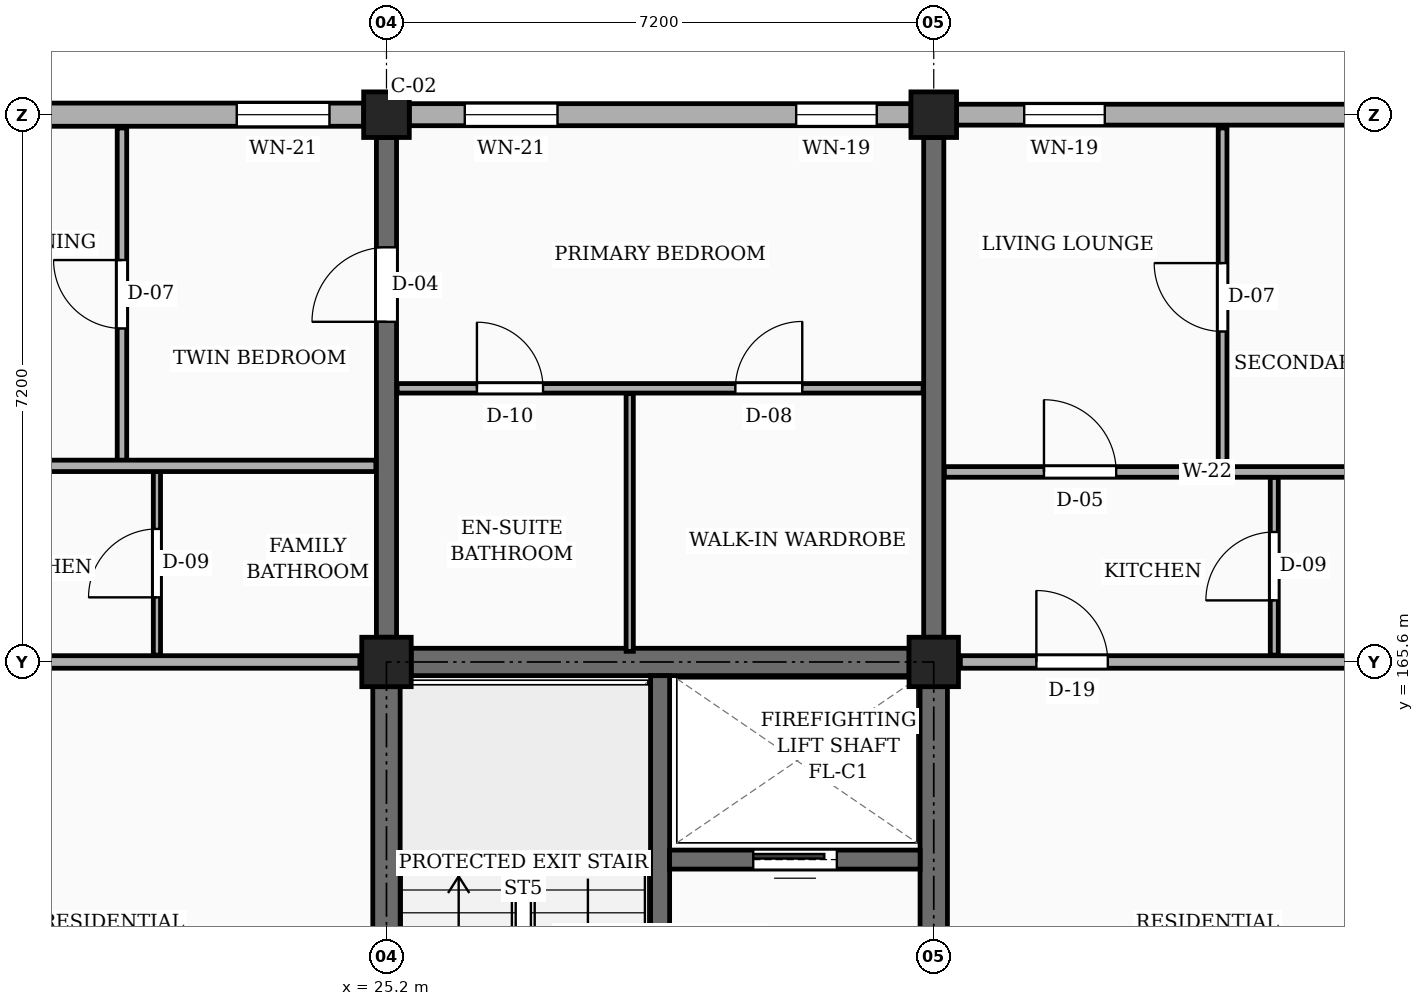
"""IFC4 building model, lengths in metres.
Left out: names, types, materials, properties, quantities, classifications, styles, units other than length and angle.
Written with IfcOpenShell. Run it as: python <this file> out.ifc"""

import sys

from ifc_helpers import new_model, si_unit, direction, frame, frame_2d, origin, origin_2d, place, context, subcontext, project, spatial, rectangle, extrude, element, fill, save


model = new_model("IFC4")
c1 = context("Model", 3, precision=1e-05, world=origin(), true_north=direction((0.0, 1.0)))
c2 = subcontext(c1, "Body", "Model", "MODEL_VIEW")
j1 = project(units=[si_unit("LENGTHUNIT", "METRE"), si_unit("PLANEANGLEUNIT", "RADIAN")], contexts=[c1])
p1 = place(None, origin())
s1 = spatial("IfcSite", under=j1, at=p1, CompositionType="ELEMENT")
p2 = place(p1, origin())
s2 = spatial("IfcBuilding", under=s1, at=p2, CompositionType="ELEMENT")
p3 = place(p2, frame((0.0, 0.0, 4.5)))
s3 = spatial("IfcBuildingStorey", under=s2, at=p3, CompositionType="ELEMENT", Elevation=4.5)
p4 = place(p3, frame((25.2, 165.6, 0.0), z_axis=(0.0, 0.0, 1.0), x_axis=(1.0, 0.0, 0.0)))
e1 = element("IfcColumn", 1, at=p4, inside=s3, PredefinedType="COLUMN", context=c2, shape_type="SweptSolid", body=[
    extrude(rectangle(XDim=0.65, YDim=0.65, at=origin_2d()), origin(), (0.0, 0.0, 1.0), 3.15),
])
p5 = place(p3, frame((25.2, 172.8, 0.0), z_axis=(0.0, 0.0, 1.0), x_axis=(1.0, 0.0, 0.0)))
e2 = element("IfcColumn", 2, at=p5, inside=s3, PredefinedType="COLUMN", context=c2, shape_type="SweptSolid", body=[
    extrude(rectangle(XDim=0.6, YDim=0.6, at=origin_2d()), origin(), (0.0, 0.0, 1.0), 3.15),
])
p6 = place(p3, frame((32.4, 165.6, 0.0), z_axis=(0.0, 0.0, 1.0), x_axis=(1.0, 0.0, 0.0)))
e3 = element("IfcColumn", 3, at=p6, inside=s3, PredefinedType="COLUMN", context=c2, shape_type="SweptSolid", body=[
    extrude(rectangle(XDim=0.65, YDim=0.65, at=origin_2d()), origin(), (0.0, 0.0, 1.0), 3.15),
])
p7 = place(p3, frame((32.4, 172.8, 0.0), z_axis=(0.0, 0.0, 1.0), x_axis=(1.0, 0.0, 0.0)))
e4 = element("IfcColumn", 4, at=p7, inside=s3, PredefinedType="COLUMN", context=c2, shape_type="SweptSolid", body=[
    extrude(rectangle(XDim=0.6, YDim=0.6, at=origin_2d()), origin(), (0.0, 0.0, 1.0), 3.15),
])
p8 = place(p3, frame((25.2, 165.925, 0.0), z_axis=(0.0, 0.0, 1.0), x_axis=(0.0, 1.0, 0.0)))
e5 = element("IfcWall", 5, at=p8, inside=s3, PredefinedType="SOLIDWALL", context=c2, shape_type="SweptSolid", body=[
    extrude(rectangle(XDim=6.575, YDim=0.265, at=frame_2d((3.288, 0.0))), origin(), (0.0, 0.0, 1.0), 2.185),
])
p9 = place(p8, frame((4.15, 0.0, 0.0)))
e6 = element("IfcOpeningElement", 6, at=p9, cuts=e5, PredefinedType="OPENING", context=c2, shape_type="SweptSolid", body=[
    extrude(rectangle(XDim=0.98, YDim=2.12, at=frame_2d((0.49, 1.06))), frame((0.0, 0.143, 0.0), z_axis=(0.0, -1.0, 0.0), x_axis=(1.0, 0.0, 0.0)), (0.0, 0.0, 1.0), 0.285),
])
p10 = place(p3, frame((32.4, 165.925, 0.0), z_axis=(0.0, 0.0, 1.0), x_axis=(0.0, 1.0, 0.0)))
e7 = element("IfcWall", 7, at=p10, inside=s3, PredefinedType="SOLIDWALL", context=c2, shape_type="SweptSolid", body=[
    extrude(rectangle(XDim=6.575, YDim=0.265, at=frame_2d((3.288, 0.0))), origin(), (0.0, 0.0, 1.0), 2.185),
])
p11 = place(p3, frame((39.3, 172.8, 0.0), z_axis=(0.0, 0.0, 1.0), x_axis=(-1.0, 0.0, 0.0)))
e8 = element("IfcWall", 8, at=p11, inside=s3, PredefinedType="SOLIDWALL", context=c2, shape_type="SweptSolid", body=[
    extrude(rectangle(XDim=6.6, YDim=0.275, at=frame_2d((3.3, 0.0))), origin(), (0.0, 0.0, 1.0), 2.455),
])
p12 = place(p11, frame((0.45, 0.0, 0.78)))
e9 = element("IfcOpeningElement", 9, at=p12, cuts=e8, PredefinedType="OPENING", context=c2, shape_type="SweptSolid", body=[
    extrude(rectangle(XDim=0.9, YDim=1.36, at=frame_2d((0.45, 0.68))), frame((0.0, 0.147, 0.0), z_axis=(0.0, -1.0, 0.0), x_axis=(1.0, 0.0, 0.0)), (0.0, 0.0, 1.0), 0.295),
])
p13 = place(p11, frame((4.65, 0.0, 0.78)))
e10 = element("IfcOpeningElement", 10, at=p13, cuts=e8, PredefinedType="OPENING", context=c2, shape_type="SweptSolid", body=[
    extrude(rectangle(XDim=1.06, YDim=1.36, at=frame_2d((0.53, 0.68))), frame((0.0, 0.147, 0.0), z_axis=(0.0, -1.0, 0.0), x_axis=(1.0, 0.0, 0.0)), (0.0, 0.0, 1.0), 0.295),
])
p14 = place(p3, frame((32.1, 172.8, 0.0), z_axis=(0.0, 0.0, 1.0), x_axis=(-1.0, 0.0, 0.0)))
e11 = element("IfcWall", 11, at=p14, inside=s3, PredefinedType="SOLIDWALL", context=c2, shape_type="SweptSolid", body=[
    extrude(rectangle(XDim=6.6, YDim=0.29, at=frame_2d((3.3, 0.0))), origin(), (0.0, 0.0, 1.0), 2.455),
])
p15 = place(p14, frame((0.45, 0.0, 0.78)))
e12 = element("IfcOpeningElement", 12, at=p15, cuts=e11, PredefinedType="OPENING", context=c2, shape_type="SweptSolid", body=[
    extrude(rectangle(XDim=1.06, YDim=1.36, at=frame_2d((0.53, 0.68))), frame((0.0, 0.155, 0.0), z_axis=(0.0, -1.0, 0.0), x_axis=(1.0, 0.0, 0.0)), (0.0, 0.0, 1.0), 0.31),
])
p16 = place(p14, frame((4.65, 0.0, 0.78)))
e13 = element("IfcOpeningElement", 13, at=p16, cuts=e11, PredefinedType="OPENING", context=c2, shape_type="SweptSolid", body=[
    extrude(rectangle(XDim=1.22, YDim=1.36, at=frame_2d((0.61, 0.68))), frame((0.0, 0.155, 0.0), z_axis=(0.0, -1.0, 0.0), x_axis=(1.0, 0.0, 0.0)), (0.0, 0.0, 1.0), 0.31),
])
p17 = place(p3, frame((24.9, 172.8, 0.0), z_axis=(0.0, 0.0, 1.0), x_axis=(-1.0, 0.0, 0.0)))
e14 = element("IfcWall", 14, at=p17, inside=s3, PredefinedType="SOLIDWALL", context=c2, shape_type="SweptSolid", body=[
    extrude(rectangle(XDim=6.6, YDim=0.305, at=frame_2d((3.3, 0.0))), origin(), (0.0, 0.0, 1.0), 2.455),
])
p18 = place(p17, frame((0.45, 0.0, 0.78)))
e15 = element("IfcOpeningElement", 15, at=p18, cuts=e14, PredefinedType="OPENING", context=c2, shape_type="SweptSolid", body=[
    extrude(rectangle(XDim=1.22, YDim=1.36, at=frame_2d((0.61, 0.68))), frame((0.0, 0.163, 0.0), z_axis=(0.0, -1.0, 0.0), x_axis=(1.0, 0.0, 0.0)), (0.0, 0.0, 1.0), 0.325),
])
p19 = place(p17, frame((4.65, 0.0, 0.78)))
e16 = element("IfcOpeningElement", 16, at=p19, cuts=e14, PredefinedType="OPENING", context=c2, shape_type="SweptSolid", body=[
    extrude(rectangle(XDim=1.38, YDim=1.36, at=frame_2d((0.69, 0.68))), frame((0.0, 0.163, 0.0), z_axis=(0.0, -1.0, 0.0), x_axis=(1.0, 0.0, 0.0)), (0.0, 0.0, 1.0), 0.325),
])
p20 = place(p3, frame((25.2, 158.725, 0.0), z_axis=(0.0, 0.0, 1.0), x_axis=(0.0, 1.0, 0.0)))
e17 = element("IfcWall", 17, at=p20, inside=s3, PredefinedType="SHEAR", context=c2, shape_type="SweptSolid", body=[
    extrude(rectangle(XDim=6.55, YDim=0.36, at=frame_2d((3.275, 0.0))), origin(), (0.0, 0.0, 1.0), 2.885),
])
p21 = place(p3, frame((25.525, 165.6, 0.0), z_axis=(0.0, 0.0, 1.0), x_axis=(1.0, 0.0, 0.0)))
e18 = element("IfcWall", 18, at=p21, inside=s3, PredefinedType="SHEAR", context=c2, shape_type="SweptSolid", body=[
    extrude(rectangle(XDim=6.55, YDim=0.36, at=frame_2d((3.275, 0.0))), origin(), (0.0, 0.0, 1.0), 2.885),
])
p22 = place(p3, frame((32.4, 158.725, 0.0), z_axis=(0.0, 0.0, 1.0), x_axis=(0.0, 1.0, 0.0)))
e19 = element("IfcWall", 19, at=p22, inside=s3, PredefinedType="SHEAR", context=c2, shape_type="SweptSolid", body=[
    extrude(rectangle(XDim=6.55, YDim=0.36, at=frame_2d((3.275, 0.0))), origin(), (0.0, 0.0, 1.0), 2.885),
])
p23 = place(p3, frame((28.8, 158.58, 0.0), z_axis=(0.0, 0.0, 1.0), x_axis=(0.0, 1.0, 0.0)))
e20 = element("IfcWall", 20, at=p23, inside=s3, PredefinedType="SHEAR", context=c2, shape_type="SweptSolid", body=[
    extrude(rectangle(XDim=6.84, YDim=0.25, at=frame_2d((3.42, 0.0))), origin(), (0.0, 0.0, 1.0), 2.885),
])
p24 = place(p23, frame((0.42, 0.0, 0.0)))
e21 = element("IfcOpeningElement", 21, at=p24, cuts=e20, PredefinedType="OPENING", context=c2, shape_type="SweptSolid", body=[
    extrude(rectangle(XDim=1.05, YDim=2.15, at=frame_2d((0.525, 1.075))), frame((0.0, 0.135, 0.0), z_axis=(0.0, -1.0, 0.0), x_axis=(1.0, 0.0, 0.0)), (0.0, 0.0, 1.0), 0.27),
])
p25 = place(p3, frame((28.925, 163.0, 0.0), z_axis=(0.0, 0.0, 1.0), x_axis=(1.0, 0.0, 0.0)))
e22 = element("IfcWall", 22, at=p25, inside=s3, PredefinedType="SHEAR", context=c2, shape_type="SweptSolid", body=[
    extrude(rectangle(XDim=3.295, YDim=0.25, at=frame_2d((1.647, 0.0))), origin(), (0.0, 0.0, 1.0), 2.885),
])
p26 = place(p25, frame((1.1, 0.0, 0.0)))
e23 = element("IfcOpeningElement", 23, at=p26, cuts=e22, PredefinedType="OPENING", context=c2, shape_type="SweptSolid", body=[
    extrude(rectangle(XDim=1.1, YDim=2.2, at=frame_2d((0.55, 1.1))), frame((0.0, 0.135, 0.0), z_axis=(0.0, -1.0, 0.0), x_axis=(1.0, 0.0, 0.0)), (0.0, 0.0, 1.0), 0.27),
])
p27 = place(p3, frame((18.35, 165.6, 0.0), z_axis=(0.0, 0.0, 1.0), x_axis=(1.0, 0.0, 0.0)))
e24 = element("IfcWall", 24, at=p27, inside=s3, PredefinedType="PARTITIONING", context=c2, shape_type="SweptSolid", body=[
    extrude(rectangle(XDim=6.5, YDim=0.165, at=frame_2d((3.25, 0.0))), origin(), (0.0, 0.0, 1.0), 2.185),
])
p28 = place(p27, frame((1.0, 0.0, 0.0)))
e25 = element("IfcOpeningElement", 25, at=p28, cuts=e24, PredefinedType="OPENING", context=c2, shape_type="SweptSolid", body=[
    extrude(rectangle(XDim=1.0, YDim=2.15, at=frame_2d((0.5, 1.075))), frame((0.0, 0.093, 0.0), z_axis=(0.0, -1.0, 0.0), x_axis=(1.0, 0.0, 0.0)), (0.0, 0.0, 1.0), 0.185),
])
p29 = place(p3, frame((32.75, 165.6, 0.0), z_axis=(0.0, 0.0, 1.0), x_axis=(1.0, 0.0, 0.0)))
e26 = element("IfcWall", 26, at=p29, inside=s3, PredefinedType="PARTITIONING", context=c2, shape_type="SweptSolid", body=[
    extrude(rectangle(XDim=6.5, YDim=0.165, at=frame_2d((3.25, 0.0))), origin(), (0.0, 0.0, 1.0), 2.185),
])
p30 = place(p29, frame((1.0, 0.0, 0.0)))
e27 = element("IfcOpeningElement", 27, at=p30, cuts=e26, PredefinedType="OPENING", context=c2, shape_type="SweptSolid", body=[
    extrude(rectangle(XDim=0.94, YDim=2.12, at=frame_2d((0.47, 1.06))), frame((0.0, 0.093, 0.0), z_axis=(0.0, -1.0, 0.0), x_axis=(1.0, 0.0, 0.0)), (0.0, 0.0, 1.0), 0.185),
])
p31 = place(p3, frame((21.72, 168.25, 0.0), z_axis=(0.0, 0.0, 1.0), x_axis=(0.0, 1.0, 0.0)))
e28 = element("IfcWall", 28, at=p31, inside=s3, PredefinedType="PARTITIONING", context=c2, shape_type="SweptSolid", body=[
    extrude(rectangle(XDim=4.375, YDim=0.125, at=frame_2d((2.188, 0.0))), origin(), (0.0, 0.0, 1.0), 2.32),
])
p32 = place(p31, frame((1.738, 0.0, 0.0)))
e29 = element("IfcOpeningElement", 29, at=p32, cuts=e28, PredefinedType="OPENING", context=c2, shape_type="SweptSolid", body=[
    extrude(rectangle(XDim=0.9, YDim=2.1, at=frame_2d((0.45, 1.05))), frame((0.0, 0.073, 0.0), z_axis=(0.0, -1.0, 0.0), x_axis=(1.0, 0.0, 0.0)), (0.0, 0.0, 1.0), 0.145),
])
p33 = place(p3, frame((22.18, 165.69, 0.0), z_axis=(0.0, 0.0, 1.0), x_axis=(0.0, 1.0, 0.0)))
e30 = element("IfcWall", 30, at=p33, inside=s3, PredefinedType="PARTITIONING", context=c2, shape_type="SweptSolid", body=[
    extrude(rectangle(XDim=2.42, YDim=0.095, at=frame_2d((1.21, 0.0))), origin(), (0.0, 0.0, 1.0), 2.32),
])
p34 = place(p33, frame((0.76, 0.0, 0.0)))
e31 = element("IfcOpeningElement", 31, at=p34, cuts=e30, PredefinedType="OPENING", context=c2, shape_type="SweptSolid", body=[
    extrude(rectangle(XDim=0.9, YDim=2.05, at=frame_2d((0.45, 1.025))), frame((0.0, 0.058, 0.0), z_axis=(0.0, -1.0, 0.0), x_axis=(1.0, 0.0, 0.0)), (0.0, 0.0, 1.0), 0.115),
])
p35 = place(p3, frame((18.14, 168.18, 0.0), z_axis=(0.0, 0.0, 1.0), x_axis=(1.0, 0.0, 0.0)))
e32 = element("IfcWall", 32, at=p35, inside=s3, PredefinedType="PARTITIONING", context=c2, shape_type="SweptSolid", body=[
    extrude(rectangle(XDim=6.92, YDim=0.15, at=frame_2d((3.46, 0.0))), origin(), (0.0, 0.0, 1.0), 2.32),
])
p36 = place(p35, frame((1.31, 0.0, 0.0)))
e33 = element("IfcOpeningElement", 33, at=p36, cuts=e32, PredefinedType="OPENING", context=c2, shape_type="SweptSolid", body=[
    extrude(rectangle(XDim=0.95, YDim=2.1, at=frame_2d((0.475, 1.05))), frame((0.0, 0.085, 0.0), z_axis=(0.0, -1.0, 0.0), x_axis=(1.0, 0.0, 0.0)), (0.0, 0.0, 1.0), 0.17),
])
p37 = place(p3, frame((25.34, 169.2, 0.0), z_axis=(0.0, 0.0, 1.0), x_axis=(1.0, 0.0, 0.0)))
e34 = element("IfcWall", 34, at=p37, inside=s3, PredefinedType="PARTITIONING", context=c2, shape_type="SweptSolid", body=[
    extrude(rectangle(XDim=6.92, YDim=0.125, at=frame_2d((3.46, 0.0))), origin(), (0.0, 0.0, 1.0), 2.32),
])
p38 = place(p37, frame((1.05, 0.0, 0.0)))
e35 = element("IfcOpeningElement", 35, at=p38, cuts=e34, PredefinedType="OPENING", context=c2, shape_type="SweptSolid", body=[
    extrude(rectangle(XDim=0.87, YDim=2.05, at=frame_2d((0.435, 1.025))), frame((0.0, 0.073, 0.0), z_axis=(0.0, -1.0, 0.0), x_axis=(1.0, 0.0, 0.0)), (0.0, 0.0, 1.0), 0.145),
])
p39 = place(p37, frame((4.45, 0.0, 0.0)))
e36 = element("IfcOpeningElement", 36, at=p39, cuts=e34, PredefinedType="OPENING", context=c2, shape_type="SweptSolid", body=[
    extrude(rectangle(XDim=0.88, YDim=2.08, at=frame_2d((0.44, 1.04))), frame((0.0, 0.073, 0.0), z_axis=(0.0, -1.0, 0.0), x_axis=(1.0, 0.0, 0.0)), (0.0, 0.0, 1.0), 0.145),
])
p40 = place(p3, frame((28.4, 165.74, 0.0), z_axis=(0.0, 0.0, 1.0), x_axis=(0.0, 1.0, 0.0)))
e37 = element("IfcWall", 37, at=p40, inside=s3, PredefinedType="PARTITIONING", context=c2, shape_type="SweptSolid", body=[
    extrude(rectangle(XDim=3.39, YDim=0.095, at=frame_2d((1.695, 0.0))), origin(), (0.0, 0.0, 1.0), 2.32),
])
p41 = place(p3, frame((36.2, 168.17, 0.0), z_axis=(0.0, 0.0, 1.0), x_axis=(0.0, 1.0, 0.0)))
e38 = element("IfcWall", 38, at=p41, inside=s3, PredefinedType="PARTITIONING", context=c2, shape_type="SweptSolid", body=[
    extrude(rectangle(XDim=4.455, YDim=0.115, at=frame_2d((2.228, 0.0))), origin(), (0.0, 0.0, 1.0), 2.32),
])
p42 = place(p41, frame((1.778, 0.0, 0.0)))
e39 = element("IfcOpeningElement", 39, at=p42, cuts=e38, PredefinedType="OPENING", context=c2, shape_type="SweptSolid", body=[
    extrude(rectangle(XDim=0.9, YDim=2.1, at=frame_2d((0.45, 1.05))), frame((0.0, 0.067, 0.0), z_axis=(0.0, -1.0, 0.0), x_axis=(1.0, 0.0, 0.0)), (0.0, 0.0, 1.0), 0.135),
])
p43 = place(p3, frame((36.88, 165.69, 0.0), z_axis=(0.0, 0.0, 1.0), x_axis=(0.0, 1.0, 0.0)))
e40 = element("IfcWall", 40, at=p43, inside=s3, PredefinedType="PARTITIONING", context=c2, shape_type="SweptSolid", body=[
    extrude(rectangle(XDim=2.34, YDim=0.105, at=frame_2d((1.17, 0.0))), origin(), (0.0, 0.0, 1.0), 2.32),
])
p44 = place(p43, frame((0.72, 0.0, 0.0)))
e41 = element("IfcOpeningElement", 41, at=p44, cuts=e40, PredefinedType="OPENING", context=c2, shape_type="SweptSolid", body=[
    extrude(rectangle(XDim=0.9, YDim=2.05, at=frame_2d((0.45, 1.025))), frame((0.0, 0.062, 0.0), z_axis=(0.0, -1.0, 0.0), x_axis=(1.0, 0.0, 0.0)), (0.0, 0.0, 1.0), 0.125),
])
p45 = place(p3, frame((32.54, 168.1, 0.0), z_axis=(0.0, 0.0, 1.0), x_axis=(1.0, 0.0, 0.0)))
e42 = element("IfcWall", 42, at=p45, inside=s3, PredefinedType="PARTITIONING", context=c2, shape_type="SweptSolid", body=[
    extrude(rectangle(XDim=6.92, YDim=0.14, at=frame_2d((3.46, 0.0))), origin(), (0.0, 0.0, 1.0), 2.32),
])
p46 = place(p45, frame((1.31, 0.0, 0.0)))
e43 = element("IfcOpeningElement", 43, at=p46, cuts=e42, PredefinedType="OPENING", context=c2, shape_type="SweptSolid", body=[
    extrude(rectangle(XDim=0.95, YDim=2.1, at=frame_2d((0.475, 1.05))), frame((0.0, 0.08, 0.0), z_axis=(0.0, -1.0, 0.0), x_axis=(1.0, 0.0, 0.0)), (0.0, 0.0, 1.0), 0.16),
])
p47 = place(p13, origin())
e44 = element("IfcWindow", 44, at=p47, inside=s3, PartitioningType="SINGLE_PANEL", PredefinedType="WINDOW", context=c2, shape_type="SweptSolid", body=[
    extrude(rectangle(XDim=1.06, YDim=1.36, at=frame_2d((0.53, 0.68))), frame((0.0, 0.03, 0.0), z_axis=(0.0, -1.0, 0.0), x_axis=(1.0, 0.0, 0.0)), (0.0, 0.0, 1.0), 0.06),
])
fill(e10, e44)
p48 = place(p15, origin())
e45 = element("IfcWindow", 45, at=p48, inside=s3, PartitioningType="SINGLE_PANEL", PredefinedType="WINDOW", context=c2, shape_type="SweptSolid", body=[
    extrude(rectangle(XDim=1.06, YDim=1.36, at=frame_2d((0.53, 0.68))), frame((0.0, 0.03, 0.0), z_axis=(0.0, -1.0, 0.0), x_axis=(1.0, 0.0, 0.0)), (0.0, 0.0, 1.0), 0.06),
])
fill(e12, e45)
p49 = place(p16, origin())
e46 = element("IfcWindow", 46, at=p49, inside=s3, PartitioningType="SINGLE_PANEL", PredefinedType="WINDOW", context=c2, shape_type="SweptSolid", body=[
    extrude(rectangle(XDim=1.22, YDim=1.36, at=frame_2d((0.61, 0.68))), frame((0.0, 0.03, 0.0), z_axis=(0.0, -1.0, 0.0), x_axis=(1.0, 0.0, 0.0)), (0.0, 0.0, 1.0), 0.06),
])
fill(e13, e46)
p50 = place(p18, origin())
e47 = element("IfcWindow", 47, at=p50, inside=s3, PartitioningType="SINGLE_PANEL", PredefinedType="WINDOW", context=c2, shape_type="SweptSolid", body=[
    extrude(rectangle(XDim=1.22, YDim=1.36, at=frame_2d((0.61, 0.68))), frame((0.0, 0.03, 0.0), z_axis=(0.0, -1.0, 0.0), x_axis=(1.0, 0.0, 0.0)), (0.0, 0.0, 1.0), 0.06),
])
fill(e15, e47)
p51 = place(p26, origin())
e48 = element("IfcDoor", 48, at=p51, inside=s3, OperationType="SLIDING_TO_LEFT", PredefinedType="DOOR", context=c2, shape_type="SweptSolid", body=[
    extrude(rectangle(XDim=1.1, YDim=2.2, at=frame_2d((0.55, 1.1))), frame((0.0, 0.025, 0.0), z_axis=(0.0, -1.0, 0.0), x_axis=(1.0, 0.0, 0.0)), (0.0, 0.0, 1.0), 0.05),
])
fill(e23, e48)
p52 = place(p30, origin())
e49 = element("IfcDoor", 49, at=p52, inside=s3, OperationType="SINGLE_SWING_LEFT", PredefinedType="DOOR", context=c2, shape_type="SweptSolid", body=[
    extrude(rectangle(XDim=0.94, YDim=2.12, at=frame_2d((0.47, 1.06))), frame((0.0, 0.025, 0.0), z_axis=(0.0, -1.0, 0.0), x_axis=(1.0, 0.0, 0.0)), (0.0, 0.0, 1.0), 0.05),
])
fill(e27, e49)
p53 = place(p32, origin())
e50 = element("IfcDoor", 50, at=p53, inside=s3, OperationType="SINGLE_SWING_RIGHT", PredefinedType="DOOR", context=c2, shape_type="SweptSolid", body=[
    extrude(rectangle(XDim=0.9, YDim=2.1, at=frame_2d((0.45, 1.05))), frame((0.0, 0.025, 0.0), z_axis=(0.0, -1.0, 0.0), x_axis=(1.0, 0.0, 0.0)), (0.0, 0.0, 1.0), 0.05),
])
fill(e29, e50)
p54 = place(p34, origin())
e51 = element("IfcDoor", 51, at=p54, inside=s3, OperationType="SINGLE_SWING_LEFT", PredefinedType="DOOR", context=c2, shape_type="SweptSolid", body=[
    extrude(rectangle(XDim=0.9, YDim=2.05, at=frame_2d((0.45, 1.025))), frame((0.0, 0.025, 0.0), z_axis=(0.0, -1.0, 0.0), x_axis=(1.0, 0.0, 0.0)), (0.0, 0.0, 1.0), 0.05),
])
fill(e31, e51)
p55 = place(p38, origin())
e52 = element("IfcDoor", 52, at=p55, inside=s3, OperationType="SINGLE_SWING_LEFT", PredefinedType="DOOR", context=c2, shape_type="SweptSolid", body=[
    extrude(rectangle(XDim=0.87, YDim=2.05, at=frame_2d((0.435, 1.025))), frame((0.0, 0.025, 0.0), z_axis=(0.0, -1.0, 0.0), x_axis=(1.0, 0.0, 0.0)), (0.0, 0.0, 1.0), 0.05),
])
fill(e35, e52)
p56 = place(p39, origin())
e53 = element("IfcDoor", 53, at=p56, inside=s3, OperationType="SINGLE_SWING_RIGHT", PredefinedType="DOOR", context=c2, shape_type="SweptSolid", body=[
    extrude(rectangle(XDim=0.88, YDim=2.08, at=frame_2d((0.44, 1.04))), frame((0.0, 0.025, 0.0), z_axis=(0.0, -1.0, 0.0), x_axis=(1.0, 0.0, 0.0)), (0.0, 0.0, 1.0), 0.05),
])
fill(e36, e53)
p57 = place(p42, origin())
e54 = element("IfcDoor", 54, at=p57, inside=s3, OperationType="SINGLE_SWING_RIGHT", PredefinedType="DOOR", context=c2, shape_type="SweptSolid", body=[
    extrude(rectangle(XDim=0.9, YDim=2.1, at=frame_2d((0.45, 1.05))), frame((0.0, 0.025, 0.0), z_axis=(0.0, -1.0, 0.0), x_axis=(1.0, 0.0, 0.0)), (0.0, 0.0, 1.0), 0.05),
])
fill(e39, e54)
p58 = place(p44, origin())
e55 = element("IfcDoor", 55, at=p58, inside=s3, OperationType="SINGLE_SWING_LEFT", PredefinedType="DOOR", context=c2, shape_type="SweptSolid", body=[
    extrude(rectangle(XDim=0.9, YDim=2.05, at=frame_2d((0.45, 1.025))), frame((0.0, 0.025, 0.0), z_axis=(0.0, -1.0, 0.0), x_axis=(1.0, 0.0, 0.0)), (0.0, 0.0, 1.0), 0.05),
])
fill(e41, e55)
p59 = place(p46, origin())
e56 = element("IfcDoor", 56, at=p59, inside=s3, OperationType="SINGLE_SWING_LEFT", PredefinedType="DOOR", context=c2, shape_type="SweptSolid", body=[
    extrude(rectangle(XDim=0.95, YDim=2.1, at=frame_2d((0.475, 1.05))), frame((0.0, 0.025, 0.0), z_axis=(0.0, -1.0, 0.0), x_axis=(1.0, 0.0, 0.0)), (0.0, 0.0, 1.0), 0.05),
])
fill(e43, e56)
p60 = place(p9, origin())
e57 = element("IfcDoor", 57, at=p60, inside=s3, OperationType="SINGLE_SWING_LEFT", PredefinedType="DOOR", context=c2, shape_type="SweptSolid", body=[
    extrude(rectangle(XDim=0.98, YDim=2.12, at=frame_2d((0.49, 1.06))), frame((0.0, 0.025, 0.0), z_axis=(0.0, -1.0, 0.0), x_axis=(1.0, 0.0, 0.0)), (0.0, 0.0, 1.0), 0.05),
])
fill(e6, e57)
save(model, sys.argv[1])
